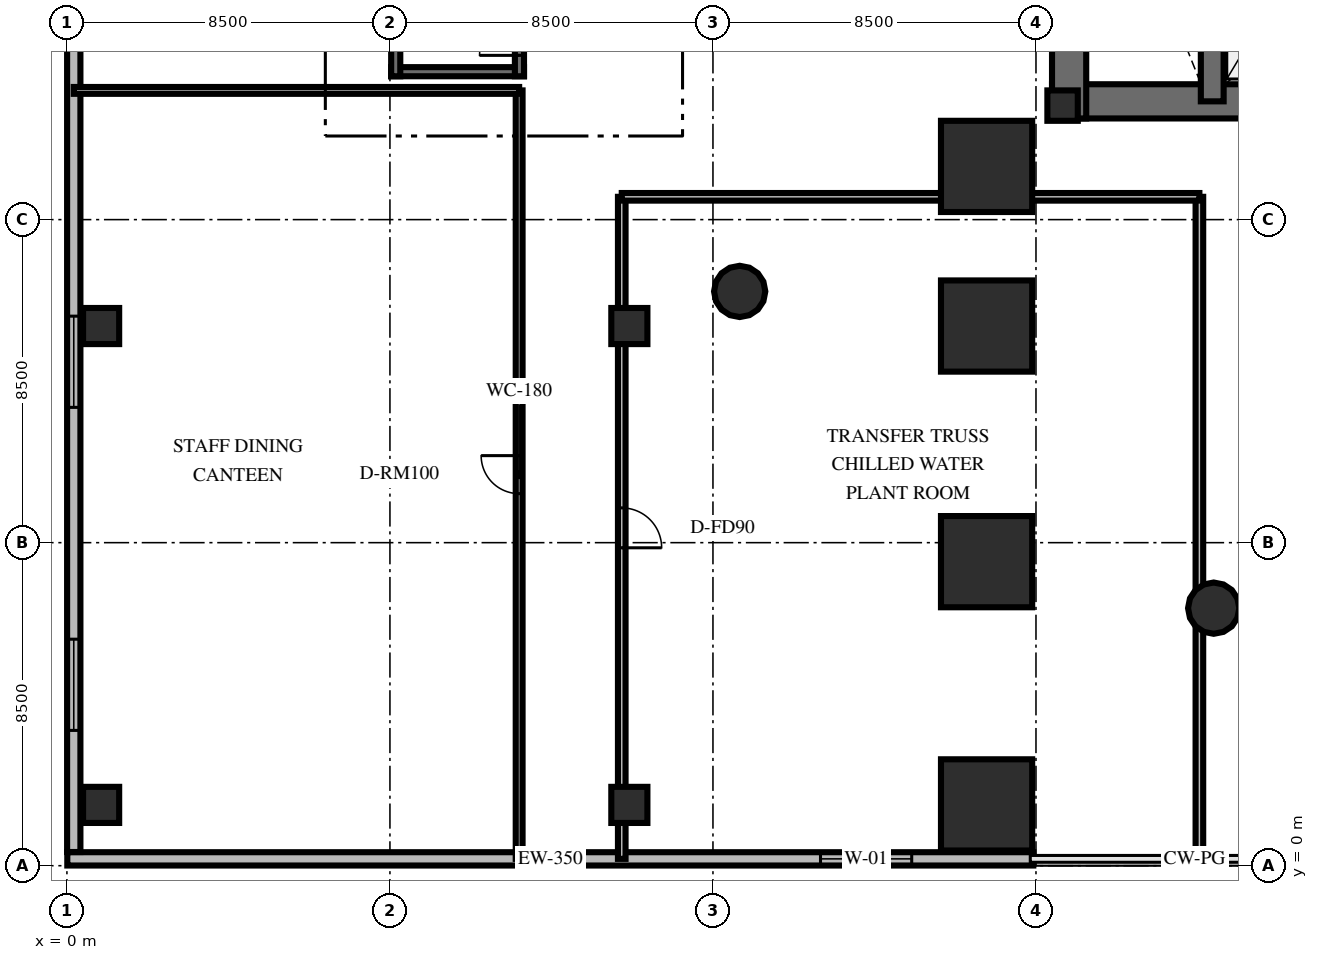
"""IFC4 building model, lengths in metres.
Left out: names, types, materials, properties, quantities, classifications, styles, units other than length and angle.
Written with IfcOpenShell. Run it as: python <this file> out.ifc"""

import sys

from ifc_helpers import new_model, si_unit, direction, frame, frame_2d, origin, origin_2d, place, context, subcontext, project, spatial, rectangle, circle, extrude, element, fill, save


model = new_model("IFC4")
c1 = context("Model", 3, precision=1e-05, world=origin(), true_north=direction((0.0, 1.0)))
c2 = subcontext(c1, "Body", "Model", "MODEL_VIEW")
j1 = project(units=[si_unit("LENGTHUNIT", "METRE"), si_unit("PLANEANGLEUNIT", "RADIAN")], contexts=[c1])
p1 = place(None, origin())
s1 = spatial("IfcSite", under=j1, at=p1, CompositionType="ELEMENT")
p2 = place(p1, origin())
s2 = spatial("IfcBuilding", under=s1, at=p2, CompositionType="ELEMENT")
p3 = place(p2, frame((0.0, 0.0, 20.4)))
s3 = spatial("IfcBuildingStorey", under=s2, at=p3, CompositionType="ELEMENT", Elevation=20.4)
p4 = place(p3, frame((25.922, 20.112, 0.0), z_axis=(0.0, 0.0, 1.0), x_axis=(1.0, 0.0, 0.0)))
e1 = element("IfcWall", 1, at=p4, inside=s3, PredefinedType="SHEAR", context=c2, shape_type="SweptSolid", body=[
    extrude(rectangle(XDim=16.166, YDim=0.9, at=frame_2d((8.083, 0.0))), origin(), (0.0, 0.0, 1.0), 4.8),
])
p5 = place(p3, frame((26.372, 19.662, 0.0), z_axis=(0.0, 0.0, 1.0), x_axis=(0.0, 1.0, 0.0)))
e2 = element("IfcWall", 2, at=p5, inside=s3, PredefinedType="SHEAR", context=c2, shape_type="SweptSolid", body=[
    extrude(rectangle(XDim=10.876, YDim=0.9, at=frame_2d((5.438, 0.0))), origin(), (0.0, 0.0, 1.0), 4.8),
])
p6 = place(p3, frame((30.138, 20.112, 0.0), z_axis=(0.0, 0.0, 1.0), x_axis=(0.0, 1.0, 0.0)))
e3 = element("IfcWall", 3, at=p6, inside=s3, PredefinedType="SHEAR", context=c2, shape_type="SweptSolid", body=[
    extrude(rectangle(XDim=9.976, YDim=0.6, at=frame_2d((4.988, 0.0))), origin(), (0.0, 0.0, 1.0), 4.8),
])
p7 = place(p3, frame((26.2, 20.0, 0.0), z_axis=(0.0, 0.0, 1.0), x_axis=(1.0, 0.0, 0.0)))
e4 = element("IfcColumn", 4, at=p7, inside=s3, PredefinedType="PILASTER", context=c2, shape_type="SweptSolid", body=[
    extrude(rectangle(XDim=0.8, YDim=0.8, at=origin_2d()), origin(), (0.0, 0.0, 1.0), 4.8),
])
p8 = place(p3, frame((8.532, 20.892, 0.0), z_axis=(0.0, 0.0, 1.0), x_axis=(1.0, 0.0, 0.0)))
e5 = element("IfcWall", 5, at=p8, inside=s3, PredefinedType="SHEAR", context=c2, shape_type="SweptSolid", body=[
    extrude(rectangle(XDim=3.496, YDim=0.24, at=frame_2d((1.748, 0.0))), origin(), (0.0, 0.0, 1.0), 4.8),
])
p9 = place(p3, frame((8.652, 20.772, 0.0), z_axis=(0.0, 0.0, 1.0), x_axis=(0.0, 1.0, 0.0)))
e6 = element("IfcWall", 6, at=p9, inside=s3, PredefinedType="SHEAR", context=c2, shape_type="SweptSolid", body=[
    extrude(rectangle(XDim=9.556, YDim=0.24, at=frame_2d((4.778, 0.0))), origin(), (0.0, 0.0, 1.0), 4.8),
])
p10 = place(p3, frame((11.908, 20.772, 0.0), z_axis=(0.0, 0.0, 1.0), x_axis=(0.0, 1.0, 0.0)))
e7 = element("IfcWall", 7, at=p10, inside=s3, PredefinedType="SHEAR", context=c2, shape_type="SweptSolid", body=[
    extrude(rectangle(XDim=9.556, YDim=0.24, at=frame_2d((4.778, 0.0))), origin(), (0.0, 0.0, 1.0), 4.8),
])
p11 = place(p10, frame((0.55, 0.0, 0.0)))
e8 = element("IfcOpeningElement", 8, at=p11, cuts=e7, PredefinedType="OPENING", context=c2, shape_type="SweptSolid", body=[
    extrude(rectangle(XDim=1.05, YDim=2.15, at=frame_2d((0.525, 1.075))), frame((0.0, 0.13, 0.0), z_axis=(0.0, -1.0, 0.0), x_axis=(1.0, 0.0, 0.0)), (0.0, 0.0, 1.0), 0.26),
])
for number, where, z_axis, x_axis in (
    (9, (24.2, 1.6, 0.0), (0.0, 0.0, 1.0), (1.0, 0.0, 0.0)),
    (10, (24.2, 8.0, 0.0), (0.0, 0.0, 1.0), (1.0, 0.0, 0.0)),
    (11, (24.2, 14.2, 0.0), (0.0, 0.0, 1.0), (1.0, 0.0, 0.0)),
    (12, (24.2, 18.4, 0.0), (0.0, 0.0, 1.0), (1.0, 0.0, 0.0)),
):
    element("IfcColumn", number, at=place(p3, frame(where, z_axis=z_axis, x_axis=x_axis)), inside=s3, PredefinedType="USERDEFINED", context=c2, shape_type="SweptSolid", body=[
        extrude(rectangle(XDim=2.4, YDim=2.4, at=origin_2d()), origin(), (0.0, 0.0, 1.0), 4.8),
    ])
for number, where, z_axis, x_axis in (
    (13, (0.9, 1.6, 0.0), (0.0, 0.0, 1.0), (1.0, 0.0, 0.0)),
    (14, (0.9, 14.2, 0.0), (0.0, 0.0, 1.0), (1.0, 0.0, 0.0)),
    (15, (14.8, 1.6, 0.0), (0.0, 0.0, 1.0), (1.0, 0.0, 0.0)),
    (16, (14.8, 14.2, 0.0), (0.0, 0.0, 1.0), (1.0, 0.0, 0.0)),
):
    element("IfcColumn", number, at=place(p3, frame(where, z_axis=z_axis, x_axis=x_axis)), inside=s3, PredefinedType="COLUMN", context=c2, shape_type="SweptSolid", body=[
        extrude(rectangle(XDim=0.95, YDim=0.95, at=origin_2d()), origin(), (0.0, 0.0, 1.0), 4.8),
    ])
for number, where, z_axis, x_axis in (
    (17, (17.703, 15.111, 0.0), (0.0, 0.0, 1.0), (1.0, 0.0, 0.0)),
    (18, (30.176, 6.777, 0.0), (0.0, 0.0, 1.0), (1.0, 0.0, 0.0)),
):
    element("IfcColumn", number, at=place(p3, frame(where, z_axis=z_axis, x_axis=x_axis)), inside=s3, PredefinedType="COLUMN", context=c2, shape_type="SweptSolid", body=[
        extrude(circle(Radius=0.675, at=origin_2d()), origin(), (0.0, 0.0, 1.0), 4.8),
    ])
p12 = place(p3, frame((25.43, 0.18, 0.0), z_axis=(0.0, 0.0, 1.0), x_axis=(-1.0, 0.0, 0.0)))
e19 = element("IfcWall", 19, at=p12, inside=s3, PredefinedType="SOLIDWALL", context=c2, shape_type="SweptSolid", body=[
    extrude(rectangle(XDim=25.42, YDim=0.35, at=frame_2d((12.71, 0.0))), origin(), (0.0, 0.0, 1.0), 3.76),
])
p13 = place(p12, frame((3.2, 0.0, 0.85)))
e20 = element("IfcOpeningElement", 20, at=p13, cuts=e19, PredefinedType="OPENING", context=c2, shape_type="SweptSolid", body=[
    extrude(rectangle(XDim=2.4, YDim=2.4, at=frame_2d((1.2, 1.2))), frame((0.0, 0.185, 0.0), z_axis=(0.0, -1.0, 0.0), x_axis=(1.0, 0.0, 0.0)), (0.0, 0.0, 1.0), 0.37),
])
p14 = place(p3, frame((0.18, 0.36, 0.0), z_axis=(0.0, 0.0, 1.0), x_axis=(0.0, 1.0, 0.0)))
e21 = element("IfcWall", 21, at=p14, inside=s3, PredefinedType="SOLIDWALL", context=c2, shape_type="SweptSolid", body=[
    extrude(rectangle(XDim=51.28, YDim=0.35, at=frame_2d((25.64, 0.0))), origin(), (0.0, 0.0, 1.0), 3.76),
])
p15 = place(p14, frame((3.2, 0.0, 0.85)))
e22 = element("IfcOpeningElement", 22, at=p15, cuts=e21, PredefinedType="OPENING", context=c2, shape_type="SweptSolid", body=[
    extrude(rectangle(XDim=2.4, YDim=2.4, at=frame_2d((1.2, 1.2))), frame((0.0, 0.185, 0.0), z_axis=(0.0, -1.0, 0.0), x_axis=(1.0, 0.0, 0.0)), (0.0, 0.0, 1.0), 0.37),
])
p16 = place(p14, frame((11.7, 0.0, 0.85)))
e23 = element("IfcOpeningElement", 23, at=p16, cuts=e21, PredefinedType="OPENING", context=c2, shape_type="SweptSolid", body=[
    extrude(rectangle(XDim=2.4, YDim=2.4, at=frame_2d((1.2, 1.2))), frame((0.0, 0.185, 0.0), z_axis=(0.0, -1.0, 0.0), x_axis=(1.0, 0.0, 0.0)), (0.0, 0.0, 1.0), 0.37),
])
p17 = place(p14, frame((22.05, 0.0, 0.85)))
e24 = element("IfcOpeningElement", 24, at=p17, cuts=e21, PredefinedType="OPENING", context=c2, shape_type="SweptSolid", body=[
    extrude(rectangle(XDim=2.4, YDim=2.4, at=frame_2d((1.2, 1.2))), frame((0.0, 0.185, 0.0), z_axis=(0.0, -1.0, 0.0), x_axis=(1.0, 0.0, 0.0)), (0.0, 0.0, 1.0), 0.37),
])
p18 = place(p14, frame((37.2, 0.0, 0.85)))
e25 = element("IfcOpeningElement", 25, at=p18, cuts=e21, PredefinedType="OPENING", context=c2, shape_type="SweptSolid", body=[
    extrude(rectangle(XDim=2.4, YDim=2.4, at=frame_2d((1.2, 1.2))), frame((0.0, 0.185, 0.0), z_axis=(0.0, -1.0, 0.0), x_axis=(1.0, 0.0, 0.0)), (0.0, 0.0, 1.0), 0.37),
])
p19 = place(p3, frame((11.9, 0.18, 0.0), z_axis=(0.0, 0.0, 1.0), x_axis=(0.0, 1.0, 0.0)))
e26 = element("IfcWall", 26, at=p19, inside=s3, PredefinedType="PARTITIONING", context=c2, shape_type="SweptSolid", body=[
    extrude(rectangle(XDim=20.22, YDim=0.18, at=frame_2d((10.11, 0.0))), origin(), (0.0, 0.0, 1.0), 3.56),
])
p20 = place(p19, frame((9.61, 0.0, 0.0)))
e27 = element("IfcOpeningElement", 27, at=p20, cuts=e26, PredefinedType="OPENING", context=c2, shape_type="SweptSolid", body=[
    extrude(rectangle(XDim=1.0, YDim=2.15, at=frame_2d((0.5, 1.075))), frame((0.0, 0.1, 0.0), z_axis=(0.0, -1.0, 0.0), x_axis=(1.0, 0.0, 0.0)), (0.0, 0.0, 1.0), 0.2),
])
p21 = place(p3, frame((11.9, 20.4, 0.0), z_axis=(0.0, 0.0, 1.0), x_axis=(-1.0, 0.0, 0.0)))
e28 = element("IfcWall", 28, at=p21, inside=s3, PredefinedType="PARTITIONING", context=c2, shape_type="SweptSolid", body=[
    extrude(rectangle(XDim=11.72, YDim=0.18, at=frame_2d((5.86, 0.0))), origin(), (0.0, 0.0, 1.0), 3.56),
])
p22 = place(p3, frame((14.6, 17.6, 0.0), z_axis=(0.0, 0.0, 1.0), x_axis=(0.0, -1.0, 0.0)))
e29 = element("IfcWall", 29, at=p22, inside=s3, PredefinedType="SOLIDWALL", context=c2, shape_type="SweptSolid", body=[
    extrude(rectangle(XDim=17.42, YDim=0.2, at=frame_2d((8.71, 0.0))), origin(), (0.0, 0.0, 1.0), 3.56),
])
p23 = place(p22, frame((8.185, 0.0, 0.0)))
e30 = element("IfcOpeningElement", 30, at=p23, cuts=e29, PredefinedType="OPENING", context=c2, shape_type="SweptSolid", body=[
    extrude(rectangle(XDim=1.05, YDim=2.15, at=frame_2d((0.525, 1.075))), frame((0.0, 0.11, 0.0), z_axis=(0.0, -1.0, 0.0), x_axis=(1.0, 0.0, 0.0)), (0.0, 0.0, 1.0), 0.22),
])
p24 = place(p3, frame((29.8, 0.18, 0.0), z_axis=(0.0, 0.0, 1.0), x_axis=(0.0, 1.0, 0.0)))
e31 = element("IfcWall", 31, at=p24, inside=s3, PredefinedType="SOLIDWALL", context=c2, shape_type="SweptSolid", body=[
    extrude(rectangle(XDim=17.42, YDim=0.2, at=frame_2d((8.71, 0.0))), origin(), (0.0, 0.0, 1.0), 3.56),
])
p25 = place(p3, frame((29.8, 17.6, 0.0), z_axis=(0.0, 0.0, 1.0), x_axis=(-1.0, 0.0, 0.0)))
e32 = element("IfcWall", 32, at=p25, inside=s3, PredefinedType="SOLIDWALL", context=c2, shape_type="SweptSolid", body=[
    extrude(rectangle(XDim=15.2, YDim=0.2, at=frame_2d((7.6, 0.0))), origin(), (0.0, 0.0, 1.0), 3.56),
])
p26 = place(p13, origin())
e33 = element("IfcWindow", 33, at=p26, inside=s3, PartitioningType="SINGLE_PANEL", PredefinedType="WINDOW", context=c2, shape_type="SweptSolid", body=[
    extrude(rectangle(XDim=2.4, YDim=2.4, at=frame_2d((1.2, 1.2))), frame((0.0, 0.03, 0.0), z_axis=(0.0, -1.0, 0.0), x_axis=(1.0, 0.0, 0.0)), (0.0, 0.0, 1.0), 0.06),
])
fill(e20, e33)
p27 = place(p15, origin())
e34 = element("IfcWindow", 34, at=p27, inside=s3, PartitioningType="SINGLE_PANEL", PredefinedType="WINDOW", context=c2, shape_type="SweptSolid", body=[
    extrude(rectangle(XDim=2.4, YDim=2.4, at=frame_2d((1.2, 1.2))), frame((0.0, 0.03, 0.0), z_axis=(0.0, -1.0, 0.0), x_axis=(1.0, 0.0, 0.0)), (0.0, 0.0, 1.0), 0.06),
])
fill(e22, e34)
p28 = place(p16, origin())
e35 = element("IfcWindow", 35, at=p28, inside=s3, PartitioningType="SINGLE_PANEL", PredefinedType="WINDOW", context=c2, shape_type="SweptSolid", body=[
    extrude(rectangle(XDim=2.4, YDim=2.4, at=frame_2d((1.2, 1.2))), frame((0.0, 0.03, 0.0), z_axis=(0.0, -1.0, 0.0), x_axis=(1.0, 0.0, 0.0)), (0.0, 0.0, 1.0), 0.06),
])
fill(e23, e35)
p29 = place(p11, origin())
e36 = element("IfcDoor", 36, at=p29, inside=s3, OperationType="SINGLE_SWING_LEFT", PredefinedType="DOOR", context=c2, shape_type="SweptSolid", body=[
    extrude(rectangle(XDim=1.05, YDim=2.15, at=frame_2d((0.525, 1.075))), frame((0.0, 0.025, 0.0), z_axis=(0.0, -1.0, 0.0), x_axis=(1.0, 0.0, 0.0)), (0.0, 0.0, 1.0), 0.05),
])
fill(e8, e36)
p30 = place(p20, origin())
e37 = element("IfcDoor", 37, at=p30, inside=s3, OperationType="SINGLE_SWING_RIGHT", PredefinedType="DOOR", context=c2, shape_type="SweptSolid", body=[
    extrude(rectangle(XDim=1.0, YDim=2.15, at=frame_2d((0.5, 1.075))), frame((0.0, 0.025, 0.0), z_axis=(0.0, -1.0, 0.0), x_axis=(1.0, 0.0, 0.0)), (0.0, 0.0, 1.0), 0.05),
])
fill(e27, e37)
p31 = place(p23, origin())
e38 = element("IfcDoor", 38, at=p31, inside=s3, OperationType="SINGLE_SWING_RIGHT", PredefinedType="DOOR", context=c2, shape_type="SweptSolid", body=[
    extrude(rectangle(XDim=1.05, YDim=2.15, at=frame_2d((0.525, 1.075))), frame((0.0, 0.025, 0.0), z_axis=(0.0, -1.0, 0.0), x_axis=(1.0, 0.0, 0.0)), (0.0, 0.0, 1.0), 0.05),
])
fill(e30, e38)
save(model, sys.argv[1])
